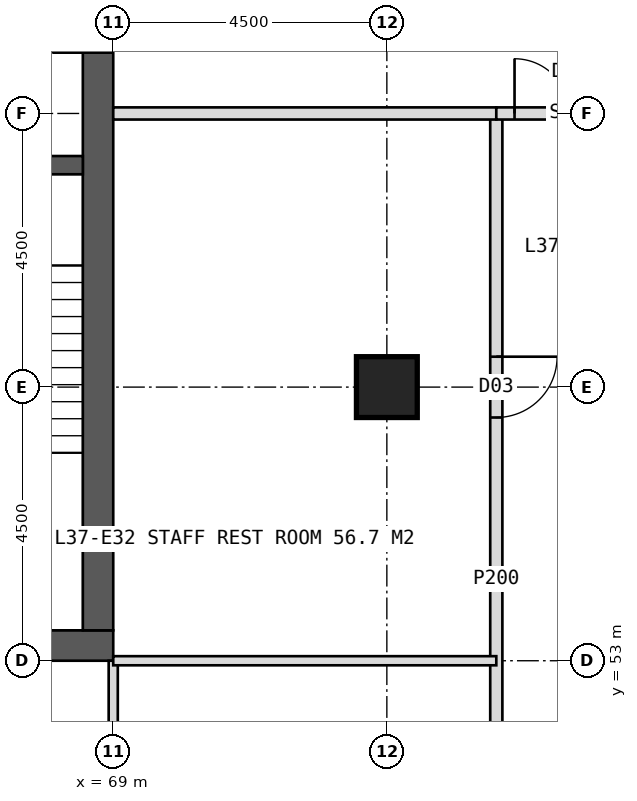
"""IFC4 building model, lengths in metres.
Left out: names, types, materials, properties, quantities, classifications, styles, units other than length and angle.
Written with IfcOpenShell. Run it as: python <this file> out.ifc"""

import sys

from ifc_helpers import new_model, si_unit, direction, frame, frame_2d, origin, origin_2d, place, context, subcontext, project, spatial, rectangle, hollow_rectangle, extrude, element, fill, save


model = new_model("IFC4")
c1 = context("Model", 3, precision=1e-05, world=origin(), true_north=direction((0.0, 1.0)))
c2 = subcontext(c1, "Body", "Model", "MODEL_VIEW")
j1 = project(units=[si_unit("LENGTHUNIT", "METRE"), si_unit("PLANEANGLEUNIT", "RADIAN")], contexts=[c1])
p1 = place(None, origin())
s1 = spatial("IfcSite", under=j1, at=p1, CompositionType="ELEMENT")
p2 = place(p1, origin())
s2 = spatial("IfcBuilding", under=s1, at=p2, CompositionType="ELEMENT")
p3 = place(p2, frame((0.0, 0.0, 156.0)))
s3 = spatial("IfcBuildingStorey", under=s2, at=p3, CompositionType="ELEMENT", Elevation=156.0)
p4 = place(p3, frame((51.0, 53.25, 0.0), z_axis=(0.0, 0.0, 1.0), x_axis=(1.0, 0.0, 0.0)))
e1 = element("IfcWall", 1, at=p4, inside=s3, PredefinedType="SHEAR", context=c2, shape_type="SweptSolid", body=[
    extrude(rectangle(XDim=18.0, YDim=0.5, at=frame_2d((9.0, 0.0))), origin(), (0.0, 0.0, 1.0), 4.0),
])
p5 = place(p4, frame((8.1, 0.0, 0.0)))
e2 = element("IfcOpeningElement", 2, at=p5, cuts=e1, PredefinedType="OPENING", context=c2, shape_type="SweptSolid", body=[
    extrude(rectangle(XDim=1.8, YDim=2.2, at=frame_2d((0.9, 1.1))), frame((0.0, 0.26, 0.0), z_axis=(0.0, -1.0, 0.0), x_axis=(1.0, 0.0, 0.0)), (0.0, 0.0, 1.0), 0.52),
])
p6 = place(p3, frame((68.75, 53.5, 0.0), z_axis=(0.0, 0.0, 1.0), x_axis=(0.0, 1.0, 0.0)))
e3 = element("IfcWall", 3, at=p6, inside=s3, PredefinedType="SHEAR", context=c2, shape_type="SweptSolid", body=[
    extrude(rectangle(XDim=17.0, YDim=0.5, at=frame_2d((8.5, 0.0))), origin(), (0.0, 0.0, 1.0), 4.0),
])
p7 = place(p6, frame((9.5, 0.0, 0.0)))
e4 = element("IfcOpeningElement", 4, at=p7, cuts=e3, PredefinedType="OPENING", context=c2, shape_type="SweptSolid", body=[
    extrude(rectangle(XDim=1.5, YDim=2.2, at=frame_2d((0.75, 1.1))), frame((0.0, 0.26, 0.0), z_axis=(0.0, -1.0, 0.0), x_axis=(1.0, 0.0, 0.0)), (0.0, 0.0, 1.0), 0.52),
])
p8 = place(p3, frame((65.2, 61.15, 0.0), z_axis=(0.0, 0.0, 1.0), x_axis=(1.0, 0.0, 0.0)))
e5 = element("IfcWall", 5, at=p8, inside=s3, PredefinedType="SHEAR", context=c2, shape_type="SweptSolid", body=[
    extrude(rectangle(XDim=3.3, YDim=0.3, at=frame_2d((1.65, 0.0))), origin(), (0.0, 0.0, 1.0), 4.0),
])
p9 = place(p8, frame((1.05, 0.0, 0.0)))
e6 = element("IfcOpeningElement", 6, at=p9, cuts=e5, PredefinedType="OPENING", context=c2, shape_type="SweptSolid", body=[
    extrude(rectangle(XDim=1.2, YDim=2.1, at=frame_2d((0.6, 1.05))), frame((0.0, 0.16, 0.0), z_axis=(0.0, -1.0, 0.0), x_axis=(1.0, 0.0, 0.0)), (0.0, 0.0, 1.0), 0.32),
])
p10 = place(p3, frame((73.5, 57.5, 0.0), z_axis=(0.0, 0.0, 1.0), x_axis=(1.0, 0.0, 0.0)))
e7 = element("IfcColumn", 7, at=p10, inside=s3, PredefinedType="COLUMN", context=c2, shape_type="SweptSolid", body=[
    extrude(hollow_rectangle(XDim=1.0, YDim=1.0, WallThickness=0.1, at=origin_2d()), origin(), (0.0, 0.0, 1.0), 4.0),
])
p11 = place(p3, frame((69.0, 53.0, 0.0), z_axis=(0.0, 0.0, 1.0), x_axis=(0.0, -1.0, 0.0)))
e8 = element("IfcWall", 8, at=p11, inside=s3, PredefinedType="PARTITIONING", context=c2, shape_type="SweptSolid", body=[
    extrude(rectangle(XDim=6.3, YDim=0.15, at=frame_2d((3.15, 0.0))), origin(), (0.0, 0.0, 1.0), 3.75),
])
p12 = place(p3, frame((75.3, 62.0, 0.0), z_axis=(0.0, 0.0, 1.0), x_axis=(0.0, -1.0, 0.0)))
e9 = element("IfcWall", 9, at=p12, inside=s3, PredefinedType="PARTITIONING", context=c2, shape_type="SweptSolid", body=[
    extrude(rectangle(XDim=15.3, YDim=0.2, at=frame_2d((7.65, 0.0))), origin(), (0.0, 0.0, 1.0), 3.75),
])
p13 = place(p12, frame((4.0, 0.0, 0.0)))
e10 = element("IfcOpeningElement", 10, at=p13, cuts=e9, PredefinedType="OPENING", context=c2, shape_type="SweptSolid", body=[
    extrude(rectangle(XDim=1.0, YDim=2.1, at=frame_2d((0.5, 1.05))), frame((0.0, 0.11, 0.0), z_axis=(0.0, -1.0, 0.0), x_axis=(1.0, 0.0, 0.0)), (0.0, 0.0, 1.0), 0.22),
])
p14 = place(p12, frame((11.65, 0.0, 0.0)))
e11 = element("IfcOpeningElement", 11, at=p14, cuts=e9, PredefinedType="OPENING", context=c2, shape_type="SweptSolid", body=[
    extrude(rectangle(XDim=1.0, YDim=2.1, at=frame_2d((0.5, 1.05))), frame((0.0, 0.11, 0.0), z_axis=(0.0, -1.0, 0.0), x_axis=(1.0, 0.0, 0.0)), (0.0, 0.0, 1.0), 0.22),
])
p15 = place(p3, frame((69.0, 62.0, 0.0), z_axis=(0.0, 0.0, 1.0), x_axis=(1.0, 0.0, 0.0)))
e12 = element("IfcWall", 12, at=p15, inside=s3, PredefinedType="SOLIDWALL", context=c2, shape_type="SweptSolid", body=[
    extrude(rectangle(XDim=6.3, YDim=0.2, at=frame_2d((3.15, 0.0))), origin(), (0.0, 0.0, 1.0), 2.95),
])
p16 = place(p3, frame((69.0, 53.0, 0.0), z_axis=(0.0, 0.0, 1.0), x_axis=(1.0, 0.0, 0.0)))
e13 = element("IfcWall", 13, at=p16, inside=s3, PredefinedType="PARTITIONING", context=c2, shape_type="SweptSolid", body=[
    extrude(rectangle(XDim=6.3, YDim=0.15, at=frame_2d((3.15, 0.0))), origin(), (0.0, 0.0, 1.0), 3.75),
])
p17 = place(p3, frame((75.3, 62.0, 0.0), z_axis=(0.0, 0.0, 1.0), x_axis=(1.0, 0.0, 0.0)))
e14 = element("IfcWall", 14, at=p17, inside=s3, PredefinedType="SOLIDWALL", context=c2, shape_type="SweptSolid", body=[
    extrude(rectangle(XDim=2.7, YDim=0.2, at=frame_2d((1.35, 0.0))), origin(), (0.0, 0.0, 1.0), 2.95),
])
p18 = place(p17, frame((0.3, 0.0, 0.0)))
e15 = element("IfcOpeningElement", 15, at=p18, cuts=e14, PredefinedType="OPENING", context=c2, shape_type="SweptSolid", body=[
    extrude(rectangle(XDim=1.8, YDim=2.2, at=frame_2d((0.9, 1.1))), frame((0.0, 0.11, 0.0), z_axis=(0.0, -1.0, 0.0), x_axis=(1.0, 0.0, 0.0)), (0.0, 0.0, 1.0), 0.22),
])
p19 = place(p13, origin())
e16 = element("IfcDoor", 16, at=p19, inside=s3, OperationType="SINGLE_SWING_LEFT", PredefinedType="DOOR", context=c2, shape_type="SweptSolid", body=[
    extrude(rectangle(XDim=1.0, YDim=2.1, at=frame_2d((0.5, 1.05))), frame((0.0, 0.025, 0.0), z_axis=(0.0, -1.0, 0.0), x_axis=(1.0, 0.0, 0.0)), (0.0, 0.0, 1.0), 0.05),
])
fill(e10, e16)
p20 = place(p18, origin())
e17 = element("IfcDoor", 17, at=p20, inside=s3, OperationType="DOUBLE_DOOR_DOUBLE_SWING", PredefinedType="DOOR", context=c2, shape_type="SweptSolid", body=[
    extrude(rectangle(XDim=1.8, YDim=2.2, at=frame_2d((0.9, 1.1))), frame((0.0, 0.025, 0.0), z_axis=(0.0, -1.0, 0.0), x_axis=(1.0, 0.0, 0.0)), (0.0, 0.0, 1.0), 0.05),
])
fill(e15, e17)
save(model, sys.argv[1])
